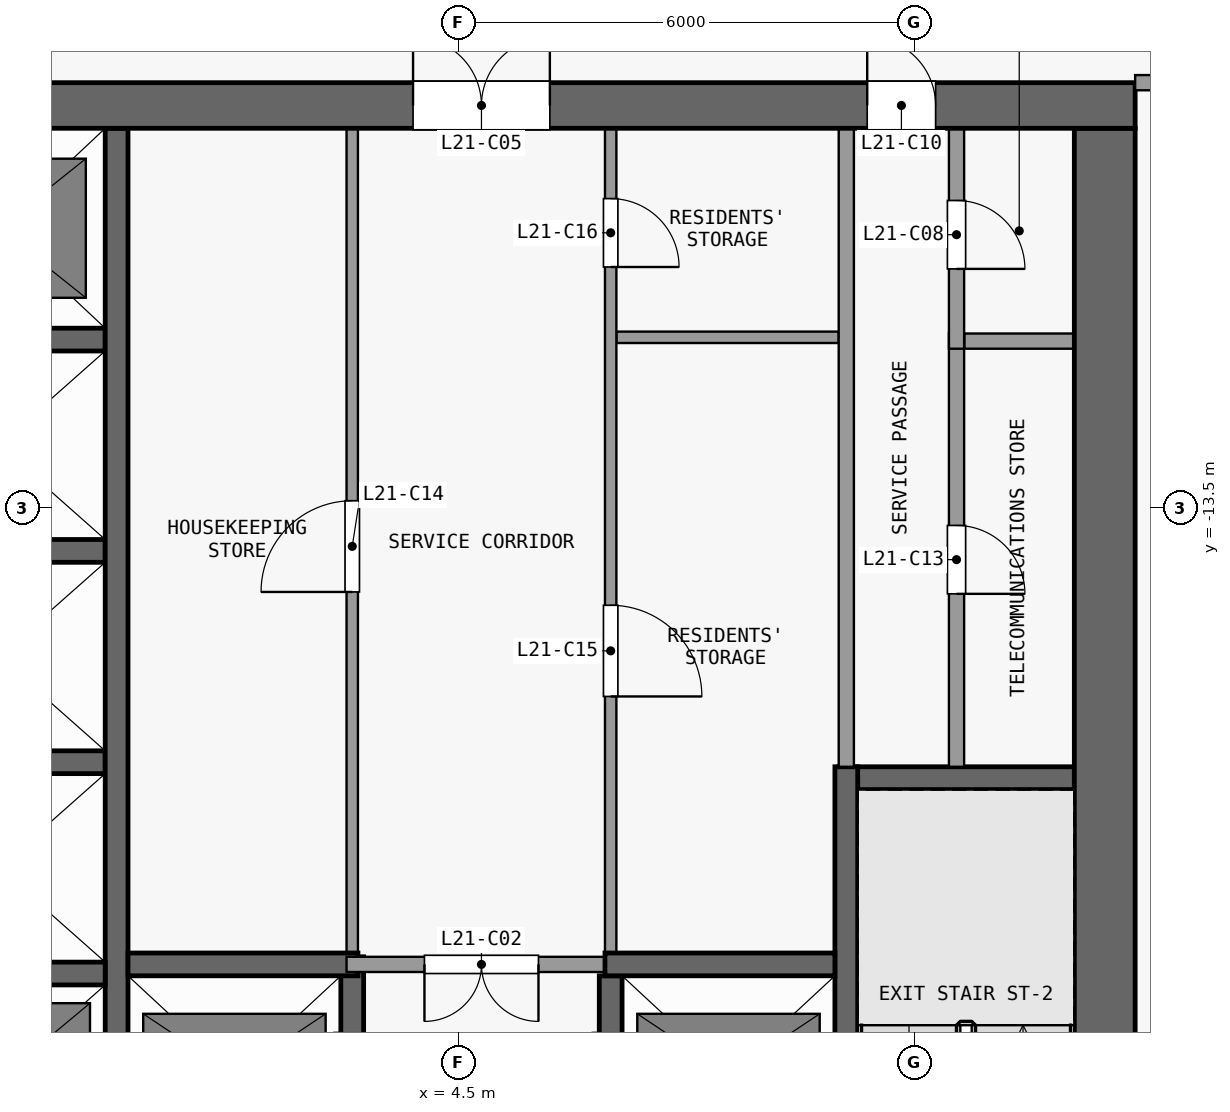
"""IFC4 building model, lengths in metres.
Left out: names, types, materials, properties, quantities, classifications, styles, units other than length and angle.
Written with IfcOpenShell. Run it as: python <this file> out.ifc"""

import sys

from ifc_helpers import new_model, si_unit, direction, frame, frame_2d, origin, place, context, subcontext, project, spatial, rectangle, extrude, element, fill, save


model = new_model("IFC4")
c1 = context("Model", 3, precision=1e-05, world=origin(), true_north=direction((0.0, 1.0)))
c2 = subcontext(c1, "Body", "Model", "MODEL_VIEW")
j1 = project(units=[si_unit("LENGTHUNIT", "METRE"), si_unit("PLANEANGLEUNIT", "RADIAN")], contexts=[c1])
p1 = place(None, origin())
s1 = spatial("IfcSite", under=j1, at=p1, CompositionType="ELEMENT")
p2 = place(p1, origin())
s2 = spatial("IfcBuilding", under=s1, at=p2, CompositionType="ELEMENT")
p3 = place(p2, frame((0.0, 0.0, 88.3)))
s3 = spatial("IfcBuildingStorey", under=s2, at=p3, CompositionType="ELEMENT", Elevation=88.3)
p4 = place(p3, frame((-13.4, -8.2, 0.0), z_axis=(0.0, 0.0, 1.0), x_axis=(1.0, 0.0, 0.0)))
e1 = element("IfcWall", 1, at=p4, inside=s3, PredefinedType="SHEAR", context=c2, shape_type="SweptSolid", body=[
    extrude(rectangle(XDim=26.8, YDim=0.6, at=frame_2d((13.4, 0.0))), origin(), (0.0, 0.0, 1.0), 3.3),
])
p5 = place(p4, frame((7.7, 0.0, 0.0)))
e2 = element("IfcOpeningElement", 2, at=p5, cuts=e1, PredefinedType="OPENING", context=c2, shape_type="SweptSolid", body=[
    extrude(rectangle(XDim=1.8, YDim=2.1, at=frame_2d((0.9, 1.05))), frame((0.0, 0.31, 0.0), z_axis=(0.0, -1.0, 0.0), x_axis=(1.0, 0.0, 0.0)), (0.0, 0.0, 1.0), 0.62),
])
p6 = place(p4, frame((17.3, 0.0, 0.0)))
e3 = element("IfcOpeningElement", 3, at=p6, cuts=e1, PredefinedType="OPENING", context=c2, shape_type="SweptSolid", body=[
    extrude(rectangle(XDim=1.8, YDim=2.1, at=frame_2d((0.9, 1.05))), frame((0.0, 0.31, 0.0), z_axis=(0.0, -1.0, 0.0), x_axis=(1.0, 0.0, 0.0)), (0.0, 0.0, 1.0), 0.62),
])
p7 = place(p4, frame((2.625, 0.0, 0.0)))
e4 = element("IfcOpeningElement", 4, at=p7, cuts=e1, PredefinedType="OPENING", context=c2, shape_type="SweptSolid", body=[
    extrude(rectangle(XDim=0.9, YDim=2.1, at=frame_2d((0.45, 1.05))), frame((0.0, 0.31, 0.0), z_axis=(0.0, -1.0, 0.0), x_axis=(1.0, 0.0, 0.0)), (0.0, 0.0, 1.0), 0.62),
])
p8 = place(p4, frame((23.275, 0.0, 0.0)))
e5 = element("IfcOpeningElement", 5, at=p8, cuts=e1, PredefinedType="OPENING", context=c2, shape_type="SweptSolid", body=[
    extrude(rectangle(XDim=0.9, YDim=2.1, at=frame_2d((0.45, 1.05))), frame((0.0, 0.31, 0.0), z_axis=(0.0, -1.0, 0.0), x_axis=(1.0, 0.0, 0.0)), (0.0, 0.0, 1.0), 0.62),
])
p9 = place(p3, frame((13.0, -24.6, 0.0), z_axis=(0.0, 0.0, 1.0), x_axis=(0.0, 1.0, 0.0)))
e6 = element("IfcWall", 6, at=p9, inside=s3, PredefinedType="SHEAR", context=c2, shape_type="SweptSolid", body=[
    extrude(rectangle(XDim=16.1, YDim=0.8, at=frame_2d((8.05, 0.0))), origin(), (0.0, 0.0, 1.0), 3.3),
])
p10 = place(p3, frame((-2.95, -19.62, 0.0), z_axis=(0.0, 0.0, 1.0), x_axis=(1.0, 0.0, 0.0)))
e7 = element("IfcWall", 7, at=p10, inside=s3, PredefinedType="SHEAR", context=c2, shape_type="SweptSolid", body=[
    extrude(rectangle(XDim=2.8, YDim=0.3, at=frame_2d((1.4, 0.0))), origin(), (0.0, 0.0, 1.0), 3.3),
])
p11 = place(p3, frame((0.15, -19.5, 0.0), z_axis=(0.0, 0.0, 1.0), x_axis=(1.0, 0.0, 0.0)))
e8 = element("IfcWall", 8, at=p11, inside=s3, PredefinedType="SHEAR", context=c2, shape_type="SweptSolid", body=[
    extrude(rectangle(XDim=3.025, YDim=0.3, at=frame_2d((1.513, 0.0))), origin(), (0.0, 0.0, 1.0), 3.3),
])
p12 = place(p3, frame((6.575, -19.5, 0.0), z_axis=(0.0, 0.0, 1.0), x_axis=(-1.0, 0.0, 0.0)))
e9 = element("IfcWall", 9, at=p12, inside=s3, PredefinedType="PARTITIONING", context=c2, shape_type="SweptSolid", body=[
    extrude(rectangle(XDim=3.55, YDim=0.2, at=frame_2d((1.775, 0.0))), origin(), (0.0, 0.0, 1.0), 3.3),
])
p13 = place(p12, frame((1.025, 0.0, 0.0)))
e10 = element("IfcOpeningElement", 10, at=p13, cuts=e9, PredefinedType="OPENING", context=c2, shape_type="SweptSolid", body=[
    extrude(rectangle(XDim=1.5, YDim=2.1, at=frame_2d((0.75, 1.05))), frame((0.0, 0.11, 0.0), z_axis=(0.0, -1.0, 0.0), x_axis=(1.0, 0.0, 0.0)), (0.0, 0.0, 1.0), 0.22),
])
p14 = place(p3, frame((6.425, -19.5, 0.0), z_axis=(0.0, 0.0, 1.0), x_axis=(1.0, 0.0, 0.0)))
e11 = element("IfcWall", 11, at=p14, inside=s3, PredefinedType="SHEAR", context=c2, shape_type="SweptSolid", body=[
    extrude(rectangle(XDim=3.025, YDim=0.3, at=frame_2d((1.512, 0.0))), origin(), (0.0, 0.0, 1.0), 3.3),
])
p15 = place(p3, frame((9.5, -17.05, 0.0), z_axis=(0.0, 0.0, 1.0), x_axis=(1.0, 0.0, 0.0)))
e12 = element("IfcWall", 12, at=p15, inside=s3, PredefinedType="SHEAR", context=c2, shape_type="SweptSolid", body=[
    extrude(rectangle(XDim=3.1, YDim=0.3, at=frame_2d((1.55, 0.0))), origin(), (0.0, 0.0, 1.0), 3.3),
])
for number, where, z_axis, x_axis in (
    (13, (-2.95, -16.84, 0.0), (0.0, 0.0, 1.0), (1.0, 0.0, 0.0)),
    (14, (-2.95, -14.06, 0.0), (0.0, 0.0, 1.0), (1.0, 0.0, 0.0)),
):
    element("IfcWall", number, at=place(p3, frame(where, z_axis=z_axis, x_axis=x_axis)), inside=s3, PredefinedType="SHEAR", context=c2, shape_type="SweptSolid", body=[
        extrude(rectangle(XDim=2.8, YDim=0.3, at=frame_2d((1.4, 0.0))), origin(), (0.0, 0.0, 1.0), 3.3),
    ])
p16 = place(p3, frame((11.15, -11.3, 0.0), z_axis=(0.0, 0.0, 1.0), x_axis=(1.0, 0.0, 0.0)))
e15 = element("IfcWall", 15, at=p16, inside=s3, PredefinedType="PARTITIONING", context=c2, shape_type="SweptSolid", body=[
    extrude(rectangle(XDim=1.45, YDim=0.2, at=frame_2d((0.725, 0.0))), origin(), (0.0, 0.0, 1.0), 3.3),
])
p17 = place(p3, frame((-2.95, -11.28, 0.0), z_axis=(0.0, 0.0, 1.0), x_axis=(1.0, 0.0, 0.0)))
e16 = element("IfcWall", 16, at=p17, inside=s3, PredefinedType="SHEAR", context=c2, shape_type="SweptSolid", body=[
    extrude(rectangle(XDim=2.8, YDim=0.3, at=frame_2d((1.4, 0.0))), origin(), (0.0, 0.0, 1.0), 3.3),
])
p18 = place(p3, frame((6.575, -11.25, 0.0), z_axis=(0.0, 0.0, 1.0), x_axis=(1.0, 0.0, 0.0)))
e17 = element("IfcWall", 17, at=p18, inside=s3, PredefinedType="PARTITIONING", context=c2, shape_type="SweptSolid", body=[
    extrude(rectangle(XDim=2.925, YDim=0.15, at=frame_2d((1.462, 0.0))), origin(), (0.0, 0.0, 1.0), 3.3),
])
p19 = place(p3, frame((0.0, -22.25, 0.0), z_axis=(0.0, 0.0, 1.0), x_axis=(0.0, 1.0, 0.0)))
e18 = element("IfcWall", 18, at=p19, inside=s3, PredefinedType="SHEAR", context=c2, shape_type="SweptSolid", body=[
    extrude(rectangle(XDim=13.75, YDim=0.3, at=frame_2d((6.875, 0.0))), origin(), (0.0, 0.0, 1.0), 3.3),
])
p20 = place(p3, frame((3.1, -22.25, 0.0), z_axis=(0.0, 0.0, 1.0), x_axis=(0.0, 1.0, 0.0)))
e19 = element("IfcWall", 19, at=p20, inside=s3, PredefinedType="SHEAR", context=c2, shape_type="SweptSolid", body=[
    extrude(rectangle(XDim=2.85, YDim=0.3, at=frame_2d((1.425, 0.0))), origin(), (0.0, 0.0, 1.0), 3.3),
])
p21 = place(p20, frame((0.75, 0.0, 0.0)))
e20 = element("IfcOpeningElement", 20, at=p21, cuts=e19, PredefinedType="OPENING", context=c2, shape_type="SweptSolid", body=[
    extrude(rectangle(XDim=1.1, YDim=2.1, at=frame_2d((0.55, 1.05))), frame((0.0, 0.16, 0.0), z_axis=(0.0, -1.0, 0.0), x_axis=(1.0, 0.0, 0.0)), (0.0, 0.0, 1.0), 0.32),
])
p22 = place(p3, frame((3.1, -19.4, 0.0), z_axis=(0.0, 0.0, 1.0), x_axis=(0.0, 1.0, 0.0)))
e21 = element("IfcWall", 21, at=p22, inside=s3, PredefinedType="PARTITIONING", context=c2, shape_type="SweptSolid", body=[
    extrude(rectangle(XDim=10.9, YDim=0.15, at=frame_2d((5.45, 0.0))), origin(), (0.0, 0.0, 1.0), 3.3),
])
p23 = place(p22, frame((4.8, 0.0, 0.0)))
e22 = element("IfcOpeningElement", 22, at=p23, cuts=e21, PredefinedType="OPENING", context=c2, shape_type="SweptSolid", body=[
    extrude(rectangle(XDim=1.2, YDim=2.1, at=frame_2d((0.6, 1.05))), frame((0.0, 0.085, 0.0), z_axis=(0.0, -1.0, 0.0), x_axis=(1.0, 0.0, 0.0)), (0.0, 0.0, 1.0), 0.17),
])
p24 = place(p3, frame((6.5, -22.25, 0.0), z_axis=(0.0, 0.0, 1.0), x_axis=(0.0, 1.0, 0.0)))
e23 = element("IfcWall", 23, at=p24, inside=s3, PredefinedType="SHEAR", context=c2, shape_type="SweptSolid", body=[
    extrude(rectangle(XDim=2.6, YDim=0.3, at=frame_2d((1.3, 0.0))), origin(), (0.0, 0.0, 1.0), 3.3),
])
p25 = place(p24, frame((0.75, 0.0, 0.0)))
e24 = element("IfcOpeningElement", 24, at=p25, cuts=e23, PredefinedType="OPENING", context=c2, shape_type="SweptSolid", body=[
    extrude(rectangle(XDim=1.1, YDim=2.1, at=frame_2d((0.55, 1.05))), frame((0.0, 0.16, 0.0), z_axis=(0.0, -1.0, 0.0), x_axis=(1.0, 0.0, 0.0)), (0.0, 0.0, 1.0), 0.32),
])
p26 = place(p3, frame((6.5, -8.5, 0.0), z_axis=(0.0, 0.0, 1.0), x_axis=(0.0, -1.0, 0.0)))
e25 = element("IfcWall", 25, at=p26, inside=s3, PredefinedType="PARTITIONING", context=c2, shape_type="SweptSolid", body=[
    extrude(rectangle(XDim=10.85, YDim=0.15, at=frame_2d((5.425, 0.0))), origin(), (0.0, 0.0, 1.0), 3.3),
])
p27 = place(p26, frame((6.275, 0.0, 0.0)))
e26 = element("IfcOpeningElement", 26, at=p27, cuts=e25, PredefinedType="OPENING", context=c2, shape_type="SweptSolid", body=[
    extrude(rectangle(XDim=1.2, YDim=2.1, at=frame_2d((0.6, 1.05))), frame((0.0, 0.085, 0.0), z_axis=(0.0, -1.0, 0.0), x_axis=(1.0, 0.0, 0.0)), (0.0, 0.0, 1.0), 0.17),
])
p28 = place(p26, frame((0.925, 0.0, 0.0)))
e27 = element("IfcOpeningElement", 27, at=p28, cuts=e25, PredefinedType="OPENING", context=c2, shape_type="SweptSolid", body=[
    extrude(rectangle(XDim=0.9, YDim=2.1, at=frame_2d((0.45, 1.05))), frame((0.0, 0.085, 0.0), z_axis=(0.0, -1.0, 0.0), x_axis=(1.0, 0.0, 0.0)), (0.0, 0.0, 1.0), 0.17),
])
p29 = place(p3, frame((9.6, -16.9, 0.0), z_axis=(0.0, 0.0, 1.0), x_axis=(0.0, -1.0, 0.0)))
e28 = element("IfcWall", 28, at=p29, inside=s3, PredefinedType="SHEAR", context=c2, shape_type="SweptSolid", body=[
    extrude(rectangle(XDim=7.7, YDim=0.3, at=frame_2d((3.85, 0.0))), origin(), (0.0, 0.0, 1.0), 3.3),
])
p30 = place(p29, frame((6.5, 0.0, 0.0)))
e29 = element("IfcOpeningElement", 29, at=p30, cuts=e28, PredefinedType="OPENING", context=c2, shape_type="SweptSolid", body=[
    extrude(rectangle(XDim=1.1, YDim=2.1, at=frame_2d((0.55, 1.05))), frame((0.0, 0.16, 0.0), z_axis=(0.0, -1.0, 0.0), x_axis=(1.0, 0.0, 0.0)), (0.0, 0.0, 1.0), 0.32),
])
p31 = place(p3, frame((9.6, -16.9, 0.0), z_axis=(0.0, 0.0, 1.0), x_axis=(0.0, 1.0, 0.0)))
e30 = element("IfcWall", 30, at=p31, inside=s3, PredefinedType="PARTITIONING", context=c2, shape_type="SweptSolid", body=[
    extrude(rectangle(XDim=8.4, YDim=0.2, at=frame_2d((4.2, 0.0))), origin(), (0.0, 0.0, 1.0), 3.3),
])
p32 = place(p3, frame((11.05, -11.2, 0.0), z_axis=(0.0, 0.0, 1.0), x_axis=(0.0, -1.0, 0.0)))
e31 = element("IfcWall", 31, at=p32, inside=s3, PredefinedType="PARTITIONING", context=c2, shape_type="SweptSolid", body=[
    extrude(rectangle(XDim=5.7, YDim=0.2, at=frame_2d((2.85, 0.0))), origin(), (0.0, 0.0, 1.0), 3.3),
])
p33 = place(p32, frame((2.525, 0.0, 0.0)))
e32 = element("IfcOpeningElement", 32, at=p33, cuts=e31, PredefinedType="OPENING", context=c2, shape_type="SweptSolid", body=[
    extrude(rectangle(XDim=0.9, YDim=2.1, at=frame_2d((0.45, 1.05))), frame((0.0, 0.11, 0.0), z_axis=(0.0, -1.0, 0.0), x_axis=(1.0, 0.0, 0.0)), (0.0, 0.0, 1.0), 0.22),
])
p34 = place(p3, frame((11.05, -8.5, 0.0), z_axis=(0.0, 0.0, 1.0), x_axis=(0.0, -1.0, 0.0)))
e33 = element("IfcWall", 33, at=p34, inside=s3, PredefinedType="PARTITIONING", context=c2, shape_type="SweptSolid", body=[
    extrude(rectangle(XDim=2.9, YDim=0.2, at=frame_2d((1.45, 0.0))), origin(), (0.0, 0.0, 1.0), 3.3),
])
p35 = place(p34, frame((0.95, 0.0, 0.0)))
e34 = element("IfcOpeningElement", 34, at=p35, cuts=e33, PredefinedType="OPENING", context=c2, shape_type="SweptSolid", body=[
    extrude(rectangle(XDim=0.9, YDim=2.1, at=frame_2d((0.45, 1.05))), frame((0.0, 0.11, 0.0), z_axis=(0.0, -1.0, 0.0), x_axis=(1.0, 0.0, 0.0)), (0.0, 0.0, 1.0), 0.22),
])
p36 = place(p3, frame((13.4, -7.9, 0.0), z_axis=(0.0, 0.0, 1.0), x_axis=(1.0, 0.0, 0.0)))
e35 = element("IfcWall", 35, at=p36, inside=s3, PredefinedType="PARTITIONING", context=c2, shape_type="SweptSolid", body=[
    extrude(rectangle(XDim=12.75, YDim=0.2, at=frame_2d((6.375, 0.0))), origin(), (0.0, 0.0, 1.0), 3.3),
])
p37 = place(p36, frame((1.0, 0.0, 0.0)))
e36 = element("IfcOpeningElement", 36, at=p37, cuts=e35, PredefinedType="OPENING", context=c2, shape_type="SweptSolid", body=[
    extrude(rectangle(XDim=1.0, YDim=2.1, at=frame_2d((0.5, 1.05))), frame((0.0, 0.11, 0.0), z_axis=(0.0, -1.0, 0.0), x_axis=(1.0, 0.0, 0.0)), (0.0, 0.0, 1.0), 0.22),
])
p38 = place(p13, origin())
e37 = element("IfcDoor", 37, at=p38, inside=s3, OperationType="DOUBLE_DOOR_SINGLE_SWING", PredefinedType="DOOR", context=c2, shape_type="SweptSolid", body=[
    extrude(rectangle(XDim=1.5, YDim=2.1, at=frame_2d((0.75, 1.05))), frame((0.0, 0.025, 0.0), z_axis=(0.0, -1.0, 0.0), x_axis=(1.0, 0.0, 0.0)), (0.0, 0.0, 1.0), 0.05),
])
fill(e10, e37)
p39 = place(p6, origin())
e38 = element("IfcDoor", 38, at=p39, inside=s3, OperationType="DOUBLE_DOOR_SINGLE_SWING", PredefinedType="DOOR", context=c2, shape_type="SweptSolid", body=[
    extrude(rectangle(XDim=1.8, YDim=2.1, at=frame_2d((0.9, 1.05))), frame((0.0, 0.025, 0.0), z_axis=(0.0, -1.0, 0.0), x_axis=(1.0, 0.0, 0.0)), (0.0, 0.0, 1.0), 0.05),
])
fill(e3, e38)
p40 = place(p35, origin())
e39 = element("IfcDoor", 39, at=p40, inside=s3, OperationType="SINGLE_SWING_RIGHT", PredefinedType="DOOR", context=c2, shape_type="SweptSolid", body=[
    extrude(rectangle(XDim=0.9, YDim=2.1, at=frame_2d((0.45, 1.05))), frame((0.0, 0.025, 0.0), z_axis=(0.0, -1.0, 0.0), x_axis=(1.0, 0.0, 0.0)), (0.0, 0.0, 1.0), 0.05),
])
fill(e34, e39)
p41 = place(p8, origin())
e40 = element("IfcDoor", 40, at=p41, inside=s3, OperationType="SINGLE_SWING_LEFT", PredefinedType="DOOR", context=c2, shape_type="SweptSolid", body=[
    extrude(rectangle(XDim=0.9, YDim=2.1, at=frame_2d((0.45, 1.05))), frame((0.0, 0.025, 0.0), z_axis=(0.0, -1.0, 0.0), x_axis=(1.0, 0.0, 0.0)), (0.0, 0.0, 1.0), 0.05),
])
fill(e5, e40)
p42 = place(p33, origin())
e41 = element("IfcDoor", 41, at=p42, inside=s3, OperationType="SINGLE_SWING_RIGHT", PredefinedType="DOOR", context=c2, shape_type="SweptSolid", body=[
    extrude(rectangle(XDim=0.9, YDim=2.1, at=frame_2d((0.45, 1.05))), frame((0.0, 0.025, 0.0), z_axis=(0.0, -1.0, 0.0), x_axis=(1.0, 0.0, 0.0)), (0.0, 0.0, 1.0), 0.05),
])
fill(e32, e41)
p43 = place(p23, origin())
e42 = element("IfcDoor", 42, at=p43, inside=s3, OperationType="SINGLE_SWING_LEFT", PredefinedType="DOOR", context=c2, shape_type="SweptSolid", body=[
    extrude(rectangle(XDim=1.2, YDim=2.1, at=frame_2d((0.6, 1.05))), frame((0.0, 0.025, 0.0), z_axis=(0.0, -1.0, 0.0), x_axis=(1.0, 0.0, 0.0)), (0.0, 0.0, 1.0), 0.05),
])
fill(e22, e42)
p44 = place(p27, origin())
e43 = element("IfcDoor", 43, at=p44, inside=s3, OperationType="SINGLE_SWING_RIGHT", PredefinedType="DOOR", context=c2, shape_type="SweptSolid", body=[
    extrude(rectangle(XDim=1.2, YDim=2.1, at=frame_2d((0.6, 1.05))), frame((0.0, 0.025, 0.0), z_axis=(0.0, -1.0, 0.0), x_axis=(1.0, 0.0, 0.0)), (0.0, 0.0, 1.0), 0.05),
])
fill(e26, e43)
p45 = place(p28, origin())
e44 = element("IfcDoor", 44, at=p45, inside=s3, OperationType="SINGLE_SWING_RIGHT", PredefinedType="DOOR", context=c2, shape_type="SweptSolid", body=[
    extrude(rectangle(XDim=0.9, YDim=2.1, at=frame_2d((0.45, 1.05))), frame((0.0, 0.025, 0.0), z_axis=(0.0, -1.0, 0.0), x_axis=(1.0, 0.0, 0.0)), (0.0, 0.0, 1.0), 0.05),
])
fill(e27, e44)
save(model, sys.argv[1])
